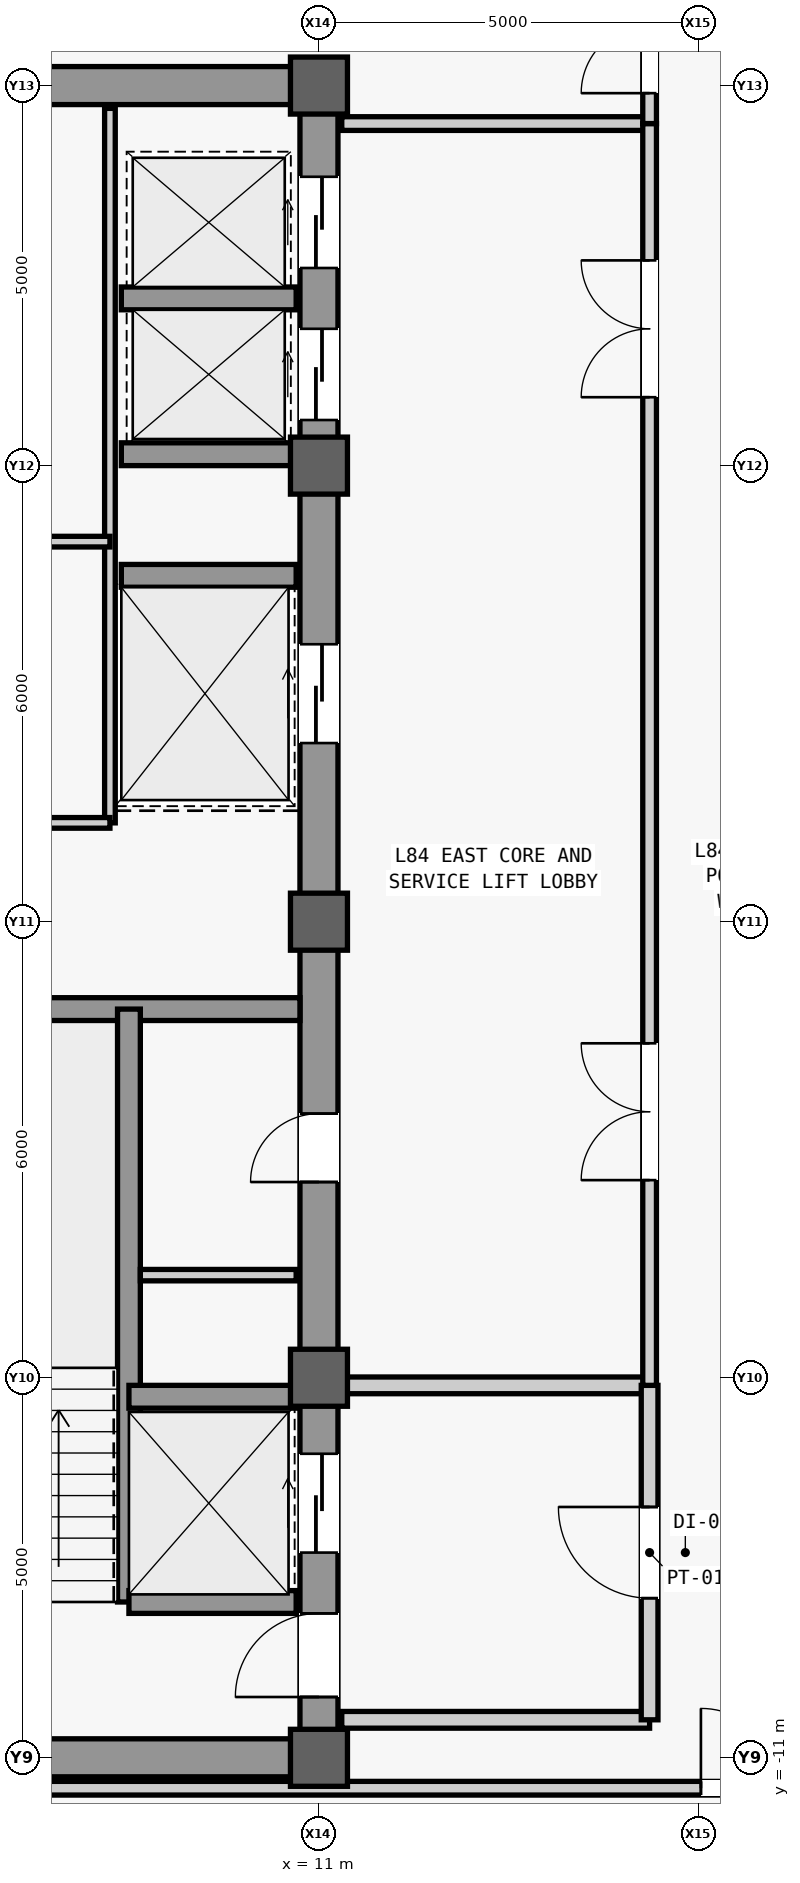
"""IFC4 building model, lengths in metres.
Left out: names, types, materials, properties, quantities, classifications, styles, units other than length and angle.
Written with IfcOpenShell. Run it as: python <this file> out.ifc"""

import sys

from ifc_helpers import new_model, si_unit, direction, frame, frame_2d, origin, origin_2d, place, context, subcontext, project, spatial, rectangle, extrude, source, transform, mapped, element, fill, save


model = new_model("IFC4")
c1 = context("Model", 3, precision=1e-05, world=origin(), true_north=direction((0.0, 1.0)))
c2 = subcontext(c1, "Body", "Model", "MODEL_VIEW")
j1 = project(units=[si_unit("LENGTHUNIT", "METRE"), si_unit("PLANEANGLEUNIT", "RADIAN")], contexts=[c1])
p1 = place(None, origin())
s1 = spatial("IfcSite", under=j1, at=p1, CompositionType="ELEMENT")
p2 = place(p1, origin())
s2 = spatial("IfcBuilding", under=s1, at=p2, CompositionType="ELEMENT")
p3 = place(p2, frame((0.0, 0.0, 354.3)))
s3 = spatial("IfcBuildingStorey", under=s2, at=p3, CompositionType="ELEMENT", Elevation=354.3)
m1 = source(origin(), c2, "Body", "SweptSolid", [
    extrude(rectangle(XDim=22.0, YDim=0.5, at=frame_2d((11.0, 0.0))), origin(), (0.0, 0.0, 1.0), 3.74),
])
p4 = place(p3, frame((11.0, -11.0, 0.0), z_axis=(0.0, 0.0, 1.0), x_axis=(0.0, 1.0, 0.0)))
e1 = element("IfcWall", 1, at=p4, inside=s3, PredefinedType="SHEAR", context=c2, shape_type="MappedRepresentation", body=[
    mapped(m1, transform((0.0, 0.0, 0.0), scale=1.0)),
])
m2 = source(origin(), c2, "Body", "SweptSolid", [
    extrude(rectangle(XDim=1.1, YDim=2.2, at=frame_2d((0.55, 1.1))), frame((0.0, 0.26, 0.0), z_axis=(0.0, -1.0, 0.0), x_axis=(1.0, 0.0, 0.0)), (0.0, 0.0, 1.0), 0.52),
])
p5 = place(p4, frame((0.8, 0.0, 0.0)))
e2 = element("IfcOpeningElement", 2, at=p5, cuts=e1, PredefinedType="OPENING", context=c2, shape_type="MappedRepresentation", body=[
    mapped(m2, transform((0.0, 0.0, 0.0), scale=1.0)),
])
m3 = source(origin(), c2, "Body", "SweptSolid", [
    extrude(rectangle(XDim=0.9, YDim=2.15, at=frame_2d((0.45, 1.075))), frame((0.0, 0.26, 0.0), z_axis=(0.0, -1.0, 0.0), x_axis=(1.0, 0.0, 0.0)), (0.0, 0.0, 1.0), 0.52),
])
p6 = place(p4, frame((7.575, 0.0, 0.0)))
e3 = element("IfcOpeningElement", 3, at=p6, cuts=e1, PredefinedType="OPENING", context=c2, shape_type="MappedRepresentation", body=[
    mapped(m3, transform((0.0, 0.0, 0.0), scale=1.0)),
])
m4 = source(origin(), c2, "Body", "SweptSolid", [
    extrude(rectangle(XDim=1.2, YDim=2.3, at=frame_2d((0.6, 1.15))), frame((0.0, 0.26, 0.0), z_axis=(0.0, -1.0, 0.0), x_axis=(1.0, 0.0, 0.0)), (0.0, 0.0, 1.0), 0.52),
])
p7 = place(p4, frame((17.6, 0.0, 0.0)))
e4 = element("IfcOpeningElement", 4, at=p7, cuts=e1, PredefinedType="OPENING", context=c2, shape_type="MappedRepresentation", body=[
    mapped(m4, transform((0.0, 0.0, 0.0), scale=1.0)),
])
p8 = place(p4, frame((19.6, 0.0, 0.0)))
e5 = element("IfcOpeningElement", 5, at=p8, cuts=e1, PredefinedType="OPENING", context=c2, shape_type="MappedRepresentation", body=[
    mapped(m4, transform((0.0, 0.0, 0.0), scale=1.0)),
])
m5 = source(origin(), c2, "Body", "SweptSolid", [
    extrude(rectangle(XDim=1.3, YDim=2.3, at=frame_2d((0.65, 1.15))), frame((0.0, 0.26, 0.0), z_axis=(0.0, -1.0, 0.0), x_axis=(1.0, 0.0, 0.0)), (0.0, 0.0, 1.0), 0.52),
])
p9 = place(p4, frame((2.7, 0.0, 0.0)))
e6 = element("IfcOpeningElement", 6, at=p9, cuts=e1, PredefinedType="OPENING", context=c2, shape_type="MappedRepresentation", body=[
    mapped(m5, transform((0.0, 0.0, 0.0), scale=1.0)),
])
p10 = place(p4, frame((13.35, 0.0, 0.0)))
e7 = element("IfcOpeningElement", 7, at=p10, cuts=e1, PredefinedType="OPENING", context=c2, shape_type="MappedRepresentation", body=[
    mapped(m5, transform((0.0, 0.0, 0.0), scale=1.0)),
])
m6 = source(origin(), c2, "Body", "SweptSolid", [
    extrude(rectangle(XDim=5.9, YDim=0.5, at=frame_2d((2.95, 0.0))), origin(), (0.0, 0.0, 1.0), 3.74),
])
p11 = place(p3, frame((4.85, -11.0, 0.0), z_axis=(0.0, 0.0, 1.0), x_axis=(1.0, 0.0, 0.0)))
e8 = element("IfcWall", 8, at=p11, inside=s3, PredefinedType="SHEAR", context=c2, shape_type="MappedRepresentation", body=[
    mapped(m6, transform((0.0, 0.0, 0.0), scale=1.0)),
])
p12 = place(p3, frame((4.85, 11.0, 0.0), z_axis=(0.0, 0.0, 1.0), x_axis=(1.0, 0.0, 0.0)))
e9 = element("IfcWall", 9, at=p12, inside=s3, PredefinedType="SHEAR", context=c2, shape_type="MappedRepresentation", body=[
    mapped(m6, transform((0.0, 0.0, 0.0), scale=1.0)),
])
p13 = place(p12, frame((0.5, 0.0, 0.0)))
e10 = element("IfcOpeningElement", 10, at=p13, cuts=e9, PredefinedType="OPENING", context=c2, shape_type="MappedRepresentation", body=[
    mapped(m3, transform((0.0, 0.0, 0.0), scale=1.0)),
])
m7 = source(origin(), c2, "Body", "SweptSolid", [
    extrude(rectangle(XDim=5.65, YDim=0.3, at=frame_2d((2.825, 0.0))), origin(), (0.0, 0.0, 1.0), 3.74),
])
p14 = place(p3, frame((5.1, -1.15, 0.0), z_axis=(0.0, 0.0, 1.0), x_axis=(1.0, 0.0, 0.0)))
e11 = element("IfcWall", 11, at=p14, inside=s3, PredefinedType="SHEAR", context=c2, shape_type="MappedRepresentation", body=[
    mapped(m7, transform((0.0, 0.0, 0.0), scale=1.0)),
])
m8 = source(origin(), c2, "Body", "SweptSolid", [
    extrude(rectangle(XDim=0.75, YDim=0.75, at=origin_2d()), origin(), (0.0, 0.0, 1.0), 4.0),
])
for number, where, z_axis, x_axis in (
    (12, (11.0, -11.0, 0.0), (0.0, 0.0, 1.0), (1.0, 0.0, 0.0)),
    (13, (11.0, -6.0, 0.0), (0.0, 0.0, 1.0), (1.0, 0.0, 0.0)),
    (14, (11.0, 0.0, 0.0), (0.0, 0.0, 1.0), (1.0, 0.0, 0.0)),
    (15, (11.0, 6.0, 0.0), (0.0, 0.0, 1.0), (1.0, 0.0, 0.0)),
    (16, (11.0, 11.0, 0.0), (0.0, 0.0, 1.0), (1.0, 0.0, 0.0)),
):
    element("IfcColumn", number, at=place(p3, frame(where, z_axis=z_axis, x_axis=x_axis)), inside=s3, PredefinedType="COLUMN", context=c2, shape_type="MappedRepresentation", body=[
        mapped(m8, transform((0.0, 0.0, 0.0), scale=1.0)),
    ])
m9 = source(origin(), c2, "Body", "SweptSolid", [
    extrude(rectangle(XDim=7.8, YDim=0.3, at=frame_2d((3.9, 0.0))), origin(), (0.0, 0.0, 1.0), 3.74),
])
p15 = place(p3, frame((8.5, -8.95, 0.0), z_axis=(0.0, 0.0, 1.0), x_axis=(0.0, 1.0, 0.0)))
e17 = element("IfcWall", 17, at=p15, inside=s3, PredefinedType="SHEAR", context=c2, shape_type="MappedRepresentation", body=[
    mapped(m9, transform((0.0, 0.0, 0.0), scale=1.0)),
])
m10 = source(origin(), c2, "Body", "SweptSolid", [
    extrude(rectangle(XDim=2.2, YDim=0.3, at=frame_2d((1.1, 0.0))), origin(), (0.0, 0.0, 1.0), 3.74),
])
for number, where, z_axis, x_axis in (
    (18, (8.5, -8.95, 0.0), (0.0, 0.0, 1.0), (1.0, 0.0, 0.0)),
    (19, (8.5, -6.25, 0.0), (0.0, 0.0, 1.0), (1.0, 0.0, 0.0)),
):
    element("IfcWall", number, at=place(p3, frame(where, z_axis=z_axis, x_axis=x_axis)), inside=s3, PredefinedType="SHEAR", context=c2, shape_type="MappedRepresentation", body=[
        mapped(m10, transform((0.0, 0.0, 0.0), scale=1.0)),
    ])
m11 = source(origin(), c2, "Body", "SweptSolid", [
    extrude(rectangle(XDim=2.3, YDim=0.3, at=frame_2d((1.15, 0.0))), origin(), (0.0, 0.0, 1.0), 3.74),
])
for number, where, z_axis, x_axis in (
    (20, (8.4, 4.55, 0.0), (0.0, 0.0, 1.0), (1.0, 0.0, 0.0)),
    (21, (8.4, 6.15, 0.0), (0.0, 0.0, 1.0), (1.0, 0.0, 0.0)),
    (22, (8.4, 8.2, 0.0), (0.0, 0.0, 1.0), (1.0, 0.0, 0.0)),
):
    element("IfcWall", number, at=place(p3, frame(where, z_axis=z_axis, x_axis=x_axis)), inside=s3, PredefinedType="SHEAR", context=c2, shape_type="MappedRepresentation", body=[
        mapped(m11, transform((0.0, 0.0, 0.0), scale=1.0)),
    ])
m12 = source(origin(), c2, "Body", "SweptSolid", [
    extrude(rectangle(XDim=2.05, YDim=0.15, at=frame_2d((1.025, 0.0))), origin(), (0.0, 0.0, 1.0), 3.74),
])
p16 = place(p3, frame((8.65, -4.65, 0.0), z_axis=(0.0, 0.0, 1.0), x_axis=(1.0, 0.0, 0.0)))
e23 = element("IfcWall", 23, at=p16, inside=s3, PredefinedType="PARTITIONING", context=c2, shape_type="MappedRepresentation", body=[
    mapped(m12, transform((0.0, 0.0, 0.0), scale=1.0)),
])
m13 = source(origin(), c2, "Body", "SweptSolid", [
    extrude(rectangle(XDim=9.4, YDim=0.14, at=frame_2d((4.7, 0.0))), origin(), (0.0, 0.0, 1.0), 3.74),
])
p17 = place(p3, frame((8.25, 1.3, 0.0), z_axis=(0.0, 0.0, 1.0), x_axis=(0.0, 1.0, 0.0)))
e24 = element("IfcWall", 24, at=p17, inside=s3, PredefinedType="PARTITIONING", context=c2, shape_type="MappedRepresentation", body=[
    mapped(m13, transform((0.0, 0.0, 0.0), scale=1.0)),
])
m14 = source(origin(), c2, "Body", "SweptSolid", [
    extrude(rectangle(XDim=3.15, YDim=0.14, at=frame_2d((1.575, 0.0))), origin(), (0.0, 0.0, 1.0), 3.74),
])
p18 = place(p3, frame((5.1, 1.3, 0.0), z_axis=(0.0, 0.0, 1.0), x_axis=(1.0, 0.0, 0.0)))
e25 = element("IfcWall", 25, at=p18, inside=s3, PredefinedType="PARTITIONING", context=c2, shape_type="MappedRepresentation", body=[
    mapped(m14, transform((0.0, 0.0, 0.0), scale=1.0)),
])
p19 = place(p3, frame((5.1, 5.0, 0.0), z_axis=(0.0, 0.0, 1.0), x_axis=(1.0, 0.0, 0.0)))
e26 = element("IfcWall", 26, at=p19, inside=s3, PredefinedType="PARTITIONING", context=c2, shape_type="MappedRepresentation", body=[
    mapped(m14, transform((0.0, 0.0, 0.0), scale=1.0)),
])
m15 = source(origin(), c2, "Body", "SweptSolid", [
    extrude(rectangle(XDim=0.9, YDim=2.15, at=frame_2d((0.45, 1.075))), frame((0.0, 0.08, 0.0), z_axis=(0.0, -1.0, 0.0), x_axis=(1.0, 0.0, 0.0)), (0.0, 0.0, 1.0), 0.16),
])
p20 = place(p19, frame((0.25, 0.0, 0.0)))
e27 = element("IfcOpeningElement", 27, at=p20, cuts=e26, PredefinedType="OPENING", context=c2, shape_type="MappedRepresentation", body=[
    mapped(m15, transform((0.0, 0.0, 0.0), scale=1.0)),
])
m16 = source(origin(), c2, "Body", "SweptSolid", [
    extrude(rectangle(XDim=4.05, YDim=0.22, at=frame_2d((2.025, 0.0))), origin(), (0.0, 0.0, 1.0), 3.74),
])
p21 = place(p3, frame((11.3, -10.5, 0.0), z_axis=(0.0, 0.0, 1.0), x_axis=(1.0, 0.0, 0.0)))
e28 = element("IfcWall", 28, at=p21, inside=s3, PredefinedType="PARTITIONING", context=c2, shape_type="MappedRepresentation", body=[
    mapped(m16, transform((0.0, 0.0, 0.0), scale=1.0)),
])
m17 = source(origin(), c2, "Body", "SweptSolid", [
    extrude(rectangle(XDim=4.05, YDim=0.22, at=frame_2d((2.025, 0.0))), origin(), (0.0, 0.0, 1.0), 3.124),
])
p22 = place(p3, frame((11.3, -6.1, 0.0), z_axis=(0.0, 0.0, 1.0), x_axis=(1.0, 0.0, 0.0)))
e29 = element("IfcWall", 29, at=p22, inside=s3, PredefinedType="PARTITIONING", context=c2, shape_type="MappedRepresentation", body=[
    mapped(m17, transform((0.0, 0.0, 0.0), scale=1.0)),
])
m18 = source(origin(), c2, "Body", "SweptSolid", [
    extrude(rectangle(XDim=4.4, YDim=0.22, at=frame_2d((2.2, 0.0))), origin(), (0.0, 0.0, 1.0), 3.74),
])
p23 = place(p3, frame((15.35, -10.5, 0.0), z_axis=(0.0, 0.0, 1.0), x_axis=(0.0, 1.0, 0.0)))
e30 = element("IfcWall", 30, at=p23, inside=s3, PredefinedType="PARTITIONING", context=c2, shape_type="MappedRepresentation", body=[
    mapped(m18, transform((0.0, 0.0, 0.0), scale=1.0)),
])
m19 = source(origin(), c2, "Body", "SweptSolid", [
    extrude(rectangle(XDim=1.2, YDim=2.2, at=frame_2d((0.6, 1.1))), frame((0.0, 0.12, 0.0), z_axis=(0.0, -1.0, 0.0), x_axis=(1.0, 0.0, 0.0)), (0.0, 0.0, 1.0), 0.24),
])
p24 = place(p23, frame((1.6, 0.0, 0.0)))
e31 = element("IfcOpeningElement", 31, at=p24, cuts=e30, PredefinedType="OPENING", context=c2, shape_type="MappedRepresentation", body=[
    mapped(m19, transform((0.0, 0.0, 0.0), scale=1.0)),
])
m20 = source(origin(), c2, "Body", "SweptSolid", [
    extrude(rectangle(XDim=4.05, YDim=0.18, at=frame_2d((2.025, 0.0))), origin(), (0.0, 0.0, 1.0), 3.74),
])
p25 = place(p3, frame((11.3, 10.5, 0.0), z_axis=(0.0, 0.0, 1.0), x_axis=(1.0, 0.0, 0.0)))
e32 = element("IfcWall", 32, at=p25, inside=s3, PredefinedType="PARTITIONING", context=c2, shape_type="MappedRepresentation", body=[
    mapped(m20, transform((0.0, 0.0, 0.0), scale=1.0)),
])
m21 = source(origin(), c2, "Body", "SweptSolid", [
    extrude(rectangle(XDim=16.6, YDim=0.18, at=frame_2d((8.3, 0.0))), origin(), (0.0, 0.0, 1.0), 3.74),
])
p26 = place(p3, frame((15.35, -6.1, 0.0), z_axis=(0.0, 0.0, 1.0), x_axis=(0.0, 1.0, 0.0)))
e33 = element("IfcWall", 33, at=p26, inside=s3, PredefinedType="PARTITIONING", context=c2, shape_type="MappedRepresentation", body=[
    mapped(m21, transform((0.0, 0.0, 0.0), scale=1.0)),
])
m22 = source(origin(), c2, "Body", "SweptSolid", [
    extrude(rectangle(XDim=1.8, YDim=2.25, at=frame_2d((0.9, 1.125))), frame((0.0, 0.1, 0.0), z_axis=(0.0, -1.0, 0.0), x_axis=(1.0, 0.0, 0.0)), (0.0, 0.0, 1.0), 0.2),
])
p27 = place(p26, frame((2.7, 0.0, 0.0)))
e34 = element("IfcOpeningElement", 34, at=p27, cuts=e33, PredefinedType="OPENING", context=c2, shape_type="MappedRepresentation", body=[
    mapped(m22, transform((0.0, 0.0, 0.0), scale=1.0)),
])
p28 = place(p26, frame((13.0, 0.0, 0.0)))
e35 = element("IfcOpeningElement", 35, at=p28, cuts=e33, PredefinedType="OPENING", context=c2, shape_type="MappedRepresentation", body=[
    mapped(m22, transform((0.0, 0.0, 0.0), scale=1.0)),
])
m23 = source(origin(), c2, "Body", "SweptSolid", [
    extrude(rectangle(XDim=2.6, YDim=0.18, at=frame_2d((1.3, 0.0))), origin(), (0.0, 0.0, 1.0), 3.74),
])
p29 = place(p3, frame((15.35, 10.5, 0.0), z_axis=(0.0, 0.0, 1.0), x_axis=(0.0, 1.0, 0.0)))
e36 = element("IfcWall", 36, at=p29, inside=s3, PredefinedType="PARTITIONING", context=c2, shape_type="MappedRepresentation", body=[
    mapped(m23, transform((0.0, 0.0, 0.0), scale=1.0)),
])
p30 = place(p29, frame((0.4, 0.0, 0.0)))
e37 = element("IfcOpeningElement", 37, at=p30, cuts=e36, PredefinedType="OPENING", context=c2, shape_type="MappedRepresentation", body=[
    mapped(m22, transform((0.0, 0.0, 0.0), scale=1.0)),
])
m24 = source(origin(), c2, "Body", "SweptSolid", [
    extrude(rectangle(XDim=12.7, YDim=0.18, at=frame_2d((6.35, 0.0))), origin(), (0.0, 0.0, 1.0), 2.79),
])
p31 = place(p3, frame((5.05, -11.4, 0.0), z_axis=(0.0, 0.0, 1.0), x_axis=(1.0, 0.0, 0.0)))
e38 = element("IfcWall", 38, at=p31, inside=s3, PredefinedType="PARTITIONING", context=c2, shape_type="MappedRepresentation", body=[
    mapped(m24, transform((0.0, 0.0, 0.0), scale=1.0)),
])
m25 = source(origin(), c2, "Body", "SweptSolid", [
    extrude(rectangle(XDim=1.05, YDim=2.2, at=frame_2d((0.525, 1.1))), frame((0.0, 0.1, 0.0), z_axis=(0.0, -1.0, 0.0), x_axis=(1.0, 0.0, 0.0)), (0.0, 0.0, 1.0), 0.2),
])
p32 = place(p31, frame((10.975, 0.0, 0.0)))
e39 = element("IfcOpeningElement", 39, at=p32, cuts=e38, PredefinedType="OPENING", context=c2, shape_type="MappedRepresentation", body=[
    mapped(m25, transform((0.0, 0.0, 0.0), scale=1.0)),
])
m26 = source(origin(), c2, "Body", "SweptSolid", [
    extrude(rectangle(XDim=1.1, YDim=2.2, at=frame_2d((0.55, 1.1))), frame((0.0, 0.025, 0.0), z_axis=(0.0, -1.0, 0.0), x_axis=(1.0, 0.0, 0.0)), (0.0, 0.0, 1.0), 0.05),
])
p33 = place(p5, origin())
e40 = element("IfcDoor", 40, at=p33, inside=s3, OperationType="SINGLE_SWING_LEFT", PredefinedType="DOOR", context=c2, shape_type="MappedRepresentation", body=[
    mapped(m26, transform((0.0, 0.0, 0.0), scale=1.0)),
])
fill(e2, e40)
m27 = source(origin(), c2, "Body", "SweptSolid", [
    extrude(rectangle(XDim=0.9, YDim=2.15, at=frame_2d((0.45, 1.075))), frame((0.0, 0.025, 0.0), z_axis=(0.0, -1.0, 0.0), x_axis=(1.0, 0.0, 0.0)), (0.0, 0.0, 1.0), 0.05),
])
p34 = place(p6, origin())
e41 = element("IfcDoor", 41, at=p34, inside=s3, OperationType="SINGLE_SWING_LEFT", PredefinedType="DOOR", context=c2, shape_type="MappedRepresentation", body=[
    mapped(m27, transform((0.0, 0.0, 0.0), scale=1.0)),
])
fill(e3, e41)
m28 = source(origin(), c2, "Body", "SweptSolid", [
    extrude(rectangle(XDim=1.2, YDim=2.2, at=frame_2d((0.6, 1.1))), frame((0.0, 0.025, 0.0), z_axis=(0.0, -1.0, 0.0), x_axis=(1.0, 0.0, 0.0)), (0.0, 0.0, 1.0), 0.05),
])
p35 = place(p24, origin())
e42 = element("IfcDoor", 42, at=p35, inside=s3, OperationType="SINGLE_SWING_RIGHT", PredefinedType="DOOR", context=c2, shape_type="MappedRepresentation", body=[
    mapped(m28, transform((0.0, 0.0, 0.0), scale=1.0)),
])
fill(e31, e42)
m29 = source(origin(), c2, "Body", "SweptSolid", [
    extrude(rectangle(XDim=1.8, YDim=2.25, at=frame_2d((0.9, 1.125))), frame((0.0, 0.025, 0.0), z_axis=(0.0, -1.0, 0.0), x_axis=(1.0, 0.0, 0.0)), (0.0, 0.0, 1.0), 0.05),
])
p36 = place(p27, origin())
e43 = element("IfcDoor", 43, at=p36, inside=s3, OperationType="SINGLE_SWING_RIGHT", PredefinedType="DOOR", context=c2, shape_type="MappedRepresentation", body=[
    mapped(m29, transform((0.0, 0.0, 0.0), scale=1.0)),
])
fill(e34, e43)
p37 = place(p28, origin())
e44 = element("IfcDoor", 44, at=p37, inside=s3, OperationType="SINGLE_SWING_LEFT", PredefinedType="DOOR", context=c2, shape_type="MappedRepresentation", body=[
    mapped(m29, transform((0.0, 0.0, 0.0), scale=1.0)),
])
fill(e35, e44)
p38 = place(p30, origin())
e45 = element("IfcDoor", 45, at=p38, inside=s3, OperationType="DOUBLE_DOOR_SINGLE_SWING", PredefinedType="DOOR", context=c2, shape_type="MappedRepresentation", body=[
    mapped(m29, transform((0.0, 0.0, 0.0), scale=1.0)),
])
fill(e37, e45)
m30 = source(origin(), c2, "Body", "SweptSolid", [
    extrude(rectangle(XDim=1.05, YDim=2.2, at=frame_2d((0.525, 1.1))), frame((0.0, 0.025, 0.0), z_axis=(0.0, -1.0, 0.0), x_axis=(1.0, 0.0, 0.0)), (0.0, 0.0, 1.0), 0.05),
])
p39 = place(p32, origin())
e46 = element("IfcDoor", 46, at=p39, inside=s3, OperationType="SINGLE_SWING_LEFT", PredefinedType="DOOR", context=c2, shape_type="MappedRepresentation", body=[
    mapped(m30, transform((0.0, 0.0, 0.0), scale=1.0)),
])
fill(e39, e46)
m31 = source(origin(), c2, "Body", "SweptSolid", [
    extrude(rectangle(XDim=1.2, YDim=2.3, at=frame_2d((0.6, 1.15))), frame((0.0, 0.025, 0.0), z_axis=(0.0, -1.0, 0.0), x_axis=(1.0, 0.0, 0.0)), (0.0, 0.0, 1.0), 0.05),
])
p40 = place(p7, origin())
e47 = element("IfcDoor", 47, at=p40, inside=s3, OperationType="SLIDING_TO_LEFT", PredefinedType="DOOR", context=c2, shape_type="MappedRepresentation", body=[
    mapped(m31, transform((0.0, 0.0, 0.0), scale=1.0)),
])
fill(e4, e47)
p41 = place(p8, origin())
e48 = element("IfcDoor", 48, at=p41, inside=s3, OperationType="SLIDING_TO_LEFT", PredefinedType="DOOR", context=c2, shape_type="MappedRepresentation", body=[
    mapped(m31, transform((0.0, 0.0, 0.0), scale=1.0)),
])
fill(e5, e48)
m32 = source(origin(), c2, "Body", "SweptSolid", [
    extrude(rectangle(XDim=1.3, YDim=2.3, at=frame_2d((0.65, 1.15))), frame((0.0, 0.025, 0.0), z_axis=(0.0, -1.0, 0.0), x_axis=(1.0, 0.0, 0.0)), (0.0, 0.0, 1.0), 0.05),
])
p42 = place(p9, origin())
e49 = element("IfcDoor", 49, at=p42, inside=s3, OperationType="SLIDING_TO_LEFT", PredefinedType="DOOR", context=c2, shape_type="MappedRepresentation", body=[
    mapped(m32, transform((0.0, 0.0, 0.0), scale=1.0)),
])
fill(e6, e49)
p43 = place(p10, origin())
e50 = element("IfcDoor", 50, at=p43, inside=s3, OperationType="SLIDING_TO_LEFT", PredefinedType="DOOR", context=c2, shape_type="MappedRepresentation", body=[
    mapped(m32, transform((0.0, 0.0, 0.0), scale=1.0)),
])
fill(e7, e50)
save(model, sys.argv[1])
